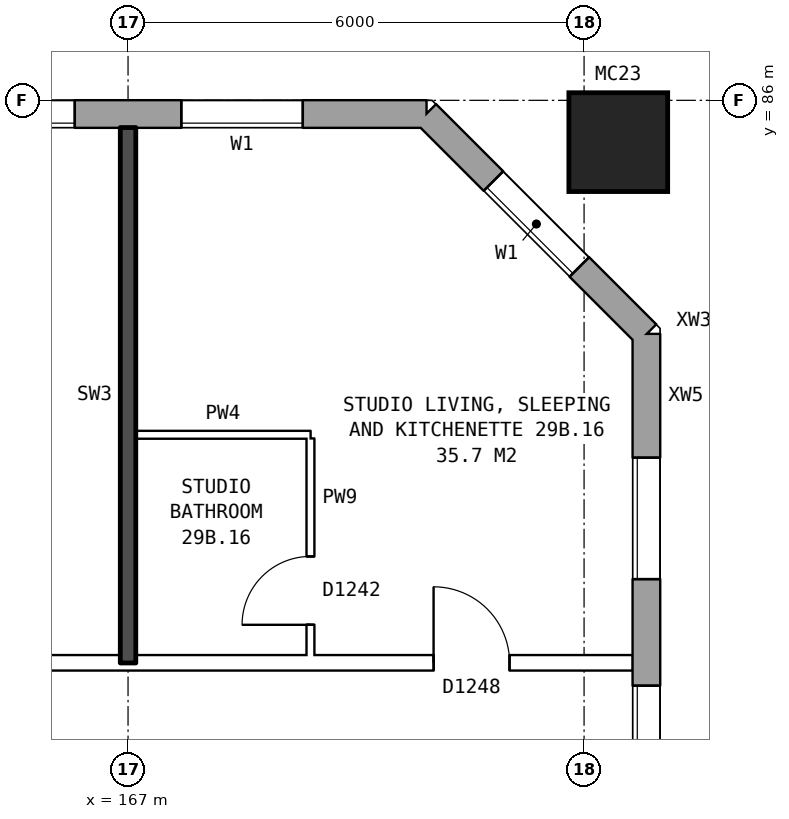
"""IFC4 building model, lengths in metres.
Left out: names, types, materials, properties, quantities, classifications, styles, units other than length and angle.
Written with IfcOpenShell. Run it as: python <this file> out.ifc"""

import sys

from ifc_helpers import new_model, si_unit, direction, frame, frame_2d, origin, origin_2d, place, context, subcontext, project, spatial, rectangle, hollow_rectangle, extrude, element, fill, save


model = new_model("IFC4")
c1 = context("Model", 3, precision=1e-05, world=origin(), true_north=direction((0.0, 1.0)))
c2 = subcontext(c1, "Body", "Model", "MODEL_VIEW")
j1 = project(units=[si_unit("LENGTHUNIT", "METRE"), si_unit("PLANEANGLEUNIT", "RADIAN")], contexts=[c1])
p1 = place(None, origin())
s1 = spatial("IfcSite", under=j1, at=p1, CompositionType="ELEMENT")
p2 = place(p1, origin())
s2 = spatial("IfcBuilding", under=s1, at=p2, CompositionType="ELEMENT")
p3 = place(p2, frame((0.0, 0.0, 105.7)))
s3 = spatial("IfcBuildingStorey", under=s2, at=p3, CompositionType="ELEMENT", Elevation=105.7)
p4 = place(p3, frame((173.45, 85.45, 0.0), z_axis=(0.0, 0.0, 1.0), x_axis=(1.0, 0.0, 0.0)))
e1 = element("IfcColumn", 1, at=p4, inside=s3, PredefinedType="COLUMN", context=c2, shape_type="SweptSolid", body=[
    extrude(hollow_rectangle(XDim=1.3, YDim=1.3, WallThickness=0.07, at=origin_2d()), origin(), (0.0, 0.0, 1.0), 3.1),
])
p5 = place(p3, frame((173.82, 57.075, 0.0), z_axis=(0.0, 0.0, 1.0), x_axis=(0.0, 1.0, 0.0)))
e2 = element("IfcWall", 2, at=p5, inside=s3, PredefinedType="STANDARD", context=c2, shape_type="SweptSolid", body=[
    extrude(rectangle(XDim=25.851, YDim=0.36, at=frame_2d((12.925, 0.0))), origin(), (0.0, 0.0, 1.0), 2.85),
])
p6 = place(p5, frame((1.625, 0.0, 0.8)))
e3 = element("IfcOpeningElement", 3, at=p6, cuts=e2, PredefinedType="OPENING", context=c2, shape_type="SweptSolid", body=[
    extrude(rectangle(XDim=1.6, YDim=1.8, at=frame_2d((0.8, 0.9))), frame((0.0, 0.19, 0.0), z_axis=(0.0, -1.0, 0.0), x_axis=(1.0, 0.0, 0.0)), (0.0, 0.0, 1.0), 0.38),
])
p7 = place(p5, frame((4.625, 0.0, 0.8)))
e4 = element("IfcOpeningElement", 4, at=p7, cuts=e2, PredefinedType="OPENING", context=c2, shape_type="SweptSolid", body=[
    extrude(rectangle(XDim=1.6, YDim=1.8, at=frame_2d((0.8, 0.9))), frame((0.0, 0.19, 0.0), z_axis=(0.0, -1.0, 0.0), x_axis=(1.0, 0.0, 0.0)), (0.0, 0.0, 1.0), 0.38),
])
p8 = place(p5, frame((6.525, 0.0, 0.8)))
e5 = element("IfcOpeningElement", 5, at=p8, cuts=e2, PredefinedType="OPENING", context=c2, shape_type="SweptSolid", body=[
    extrude(rectangle(XDim=1.6, YDim=1.5, at=frame_2d((0.8, 0.75))), frame((0.0, 0.19, 0.0), z_axis=(0.0, -1.0, 0.0), x_axis=(1.0, 0.0, 0.0)), (0.0, 0.0, 1.0), 0.38),
])
p9 = place(p5, frame((8.425, 0.0, 0.8)))
e6 = element("IfcOpeningElement", 6, at=p9, cuts=e2, PredefinedType="OPENING", context=c2, shape_type="SweptSolid", body=[
    extrude(rectangle(XDim=0.6, YDim=0.9, at=frame_2d((0.3, 0.45))), frame((0.0, 0.19, 0.0), z_axis=(0.0, -1.0, 0.0), x_axis=(1.0, 0.0, 0.0)), (0.0, 0.0, 1.0), 0.38),
])
p10 = place(p5, frame((10.275, 0.0, 1.7)))
e7 = element("IfcOpeningElement", 7, at=p10, cuts=e2, PredefinedType="OPENING", context=c2, shape_type="SweptSolid", body=[
    extrude(rectangle(XDim=0.8, YDim=0.9, at=frame_2d((0.4, 0.45))), frame((0.0, 0.19, 0.0), z_axis=(0.0, -1.0, 0.0), x_axis=(1.0, 0.0, 0.0)), (0.0, 0.0, 1.0), 0.38),
])
p11 = place(p5, frame((11.375, 0.0, 1.1)))
e8 = element("IfcOpeningElement", 8, at=p11, cuts=e2, PredefinedType="OPENING", context=c2, shape_type="SweptSolid", body=[
    extrude(rectangle(XDim=0.8, YDim=1.5, at=frame_2d((0.4, 0.75))), frame((0.0, 0.19, 0.0), z_axis=(0.0, -1.0, 0.0), x_axis=(1.0, 0.0, 0.0)), (0.0, 0.0, 1.0), 0.38),
])
p12 = place(p5, frame((19.625, 0.0, 0.8)))
e9 = element("IfcOpeningElement", 9, at=p12, cuts=e2, PredefinedType="OPENING", context=c2, shape_type="SweptSolid", body=[
    extrude(rectangle(XDim=1.6, YDim=1.8, at=frame_2d((0.8, 0.9))), frame((0.0, 0.19, 0.0), z_axis=(0.0, -1.0, 0.0), x_axis=(1.0, 0.0, 0.0)), (0.0, 0.0, 1.0), 0.38),
])
p13 = place(p5, frame((22.625, 0.0, 0.8)))
e10 = element("IfcOpeningElement", 10, at=p13, cuts=e2, PredefinedType="OPENING", context=c2, shape_type="SweptSolid", body=[
    extrude(rectangle(XDim=1.6, YDim=1.8, at=frame_2d((0.8, 0.9))), frame((0.0, 0.19, 0.0), z_axis=(0.0, -1.0, 0.0), x_axis=(1.0, 0.0, 0.0)), (0.0, 0.0, 1.0), 0.38),
])
p14 = place(p5, frame((12.475, 0.0, 0.8)))
e11 = element("IfcOpeningElement", 11, at=p14, cuts=e2, PredefinedType="OPENING", context=c2, shape_type="SweptSolid", body=[
    extrude(rectangle(XDim=1.6, YDim=1.8, at=frame_2d((0.8, 0.9))), frame((0.0, 0.19, 0.0), z_axis=(0.0, -1.0, 0.0), x_axis=(1.0, 0.0, 0.0)), (0.0, 0.0, 1.0), 0.38),
])
p15 = place(p5, frame((14.375, 0.0, 1.7)))
e12 = element("IfcOpeningElement", 12, at=p15, cuts=e2, PredefinedType="OPENING", context=c2, shape_type="SweptSolid", body=[
    extrude(rectangle(XDim=1.2, YDim=0.9, at=frame_2d((0.6, 0.45))), frame((0.0, 0.19, 0.0), z_axis=(0.0, -1.0, 0.0), x_axis=(1.0, 0.0, 0.0)), (0.0, 0.0, 1.0), 0.38),
])
p16 = place(p5, frame((16.725, 0.0, 0.8)))
e13 = element("IfcOpeningElement", 13, at=p16, cuts=e2, PredefinedType="OPENING", context=c2, shape_type="SweptSolid", body=[
    extrude(rectangle(XDim=0.6, YDim=0.9, at=frame_2d((0.3, 0.45))), frame((0.0, 0.19, 0.0), z_axis=(0.0, -1.0, 0.0), x_axis=(1.0, 0.0, 0.0)), (0.0, 0.0, 1.0), 0.38),
])
p17 = place(p5, frame((17.725, 0.0, 0.8)))
e14 = element("IfcOpeningElement", 14, at=p17, cuts=e2, PredefinedType="OPENING", context=c2, shape_type="SweptSolid", body=[
    extrude(rectangle(XDim=1.6, YDim=1.5, at=frame_2d((0.8, 0.75))), frame((0.0, 0.19, 0.0), z_axis=(0.0, -1.0, 0.0), x_axis=(1.0, 0.0, 0.0)), (0.0, 0.0, 1.0), 0.38),
])
p18 = place(p3, frame((173.82, 82.925, 0.0), z_axis=(0.0, 0.0, 1.0), x_axis=(-0.707106781187, 0.707106781187, 0.0)))
e15 = element("IfcWall", 15, at=p18, inside=s3, PredefinedType="STANDARD", context=c2, shape_type="SweptSolid", body=[
    extrude(rectangle(XDim=4.094, YDim=0.36, at=frame_2d((2.047, 0.0))), origin(), (0.0, 0.0, 1.0), 2.85),
])
p19 = place(p18, frame((1.247, 0.0, 0.8)))
e16 = element("IfcOpeningElement", 16, at=p19, cuts=e15, PredefinedType="OPENING", context=c2, shape_type="SweptSolid", body=[
    extrude(rectangle(XDim=1.6, YDim=1.8, at=frame_2d((0.8, 0.9))), frame((0.0, 0.19, 0.0), z_axis=(0.0, -1.0, 0.0), x_axis=(1.0, 0.0, 0.0)), (0.0, 0.0, 1.0), 0.38),
])
p20 = place(p3, frame((170.925, 85.82, 0.0), z_axis=(0.0, 0.0, 1.0), x_axis=(-1.0, 0.0, 0.0)))
e17 = element("IfcWall", 17, at=p20, inside=s3, PredefinedType="STANDARD", context=c2, shape_type="SweptSolid", body=[
    extrude(rectangle(XDim=36.851, YDim=0.36, at=frame_2d((18.425, 0.0))), origin(), (0.0, 0.0, 1.0), 2.85),
])
p21 = place(p20, frame((1.625, 0.0, 0.8)))
e18 = element("IfcOpeningElement", 18, at=p21, cuts=e17, PredefinedType="OPENING", context=c2, shape_type="SweptSolid", body=[
    extrude(rectangle(XDim=1.6, YDim=1.8, at=frame_2d((0.8, 0.9))), frame((0.0, 0.19, 0.0), z_axis=(0.0, -1.0, 0.0), x_axis=(1.0, 0.0, 0.0)), (0.0, 0.0, 1.0), 0.38),
])
p22 = place(p20, frame((4.625, 0.0, 0.8)))
e19 = element("IfcOpeningElement", 19, at=p22, cuts=e17, PredefinedType="OPENING", context=c2, shape_type="SweptSolid", body=[
    extrude(rectangle(XDim=1.6, YDim=1.8, at=frame_2d((0.8, 0.9))), frame((0.0, 0.19, 0.0), z_axis=(0.0, -1.0, 0.0), x_axis=(1.0, 0.0, 0.0)), (0.0, 0.0, 1.0), 0.38),
])
p23 = place(p20, frame((6.525, 0.0, 0.8)))
e20 = element("IfcOpeningElement", 20, at=p23, cuts=e17, PredefinedType="OPENING", context=c2, shape_type="SweptSolid", body=[
    extrude(rectangle(XDim=1.4, YDim=1.8, at=frame_2d((0.7, 0.9))), frame((0.0, 0.19, 0.0), z_axis=(0.0, -1.0, 0.0), x_axis=(1.0, 0.0, 0.0)), (0.0, 0.0, 1.0), 0.38),
])
p24 = place(p20, frame((10.675, 0.0, 0.8)))
e21 = element("IfcOpeningElement", 21, at=p24, cuts=e17, PredefinedType="OPENING", context=c2, shape_type="SweptSolid", body=[
    extrude(rectangle(XDim=0.6, YDim=0.9, at=frame_2d((0.3, 0.45))), frame((0.0, 0.19, 0.0), z_axis=(0.0, -1.0, 0.0), x_axis=(1.0, 0.0, 0.0)), (0.0, 0.0, 1.0), 0.38),
])
p25 = place(p20, frame((13.625, 0.0, 0.8)))
e22 = element("IfcOpeningElement", 22, at=p25, cuts=e17, PredefinedType="OPENING", context=c2, shape_type="SweptSolid", body=[
    extrude(rectangle(XDim=1.6, YDim=1.8, at=frame_2d((0.8, 0.9))), frame((0.0, 0.19, 0.0), z_axis=(0.0, -1.0, 0.0), x_axis=(1.0, 0.0, 0.0)), (0.0, 0.0, 1.0), 0.38),
])
p26 = place(p20, frame((16.625, 0.0, 0.8)))
e23 = element("IfcOpeningElement", 23, at=p26, cuts=e17, PredefinedType="OPENING", context=c2, shape_type="SweptSolid", body=[
    extrude(rectangle(XDim=1.6, YDim=1.8, at=frame_2d((0.8, 0.9))), frame((0.0, 0.19, 0.0), z_axis=(0.0, -1.0, 0.0), x_axis=(1.0, 0.0, 0.0)), (0.0, 0.0, 1.0), 0.38),
])
p27 = place(p20, frame((19.625, 0.0, 0.8)))
e24 = element("IfcOpeningElement", 24, at=p27, cuts=e17, PredefinedType="OPENING", context=c2, shape_type="SweptSolid", body=[
    extrude(rectangle(XDim=1.6, YDim=1.8, at=frame_2d((0.8, 0.9))), frame((0.0, 0.19, 0.0), z_axis=(0.0, -1.0, 0.0), x_axis=(1.0, 0.0, 0.0)), (0.0, 0.0, 1.0), 0.38),
])
p28 = place(p20, frame((22.625, 0.0, 0.8)))
e25 = element("IfcOpeningElement", 25, at=p28, cuts=e17, PredefinedType="OPENING", context=c2, shape_type="SweptSolid", body=[
    extrude(rectangle(XDim=1.6, YDim=1.8, at=frame_2d((0.8, 0.9))), frame((0.0, 0.19, 0.0), z_axis=(0.0, -1.0, 0.0), x_axis=(1.0, 0.0, 0.0)), (0.0, 0.0, 1.0), 0.38),
])
p29 = place(p20, frame((25.075, 0.0, 0.15)))
e26 = element("IfcOpeningElement", 26, at=p29, cuts=e17, PredefinedType="OPENING", context=c2, shape_type="SweptSolid", body=[
    extrude(rectangle(XDim=0.8, YDim=1.8, at=frame_2d((0.4, 0.9))), frame((0.0, 0.19, 0.0), z_axis=(0.0, -1.0, 0.0), x_axis=(1.0, 0.0, 0.0)), (0.0, 0.0, 1.0), 0.38),
])
p30 = place(p20, frame((28.625, 0.0, 0.8)))
e27 = element("IfcOpeningElement", 27, at=p30, cuts=e17, PredefinedType="OPENING", context=c2, shape_type="SweptSolid", body=[
    extrude(rectangle(XDim=1.6, YDim=1.8, at=frame_2d((0.8, 0.9))), frame((0.0, 0.19, 0.0), z_axis=(0.0, -1.0, 0.0), x_axis=(1.0, 0.0, 0.0)), (0.0, 0.0, 1.0), 0.38),
])
p31 = place(p20, frame((31.625, 0.0, 0.8)))
e28 = element("IfcOpeningElement", 28, at=p31, cuts=e17, PredefinedType="OPENING", context=c2, shape_type="SweptSolid", body=[
    extrude(rectangle(XDim=1.6, YDim=1.8, at=frame_2d((0.8, 0.9))), frame((0.0, 0.19, 0.0), z_axis=(0.0, -1.0, 0.0), x_axis=(1.0, 0.0, 0.0)), (0.0, 0.0, 1.0), 0.38),
])
p32 = place(p20, frame((34.625, 0.0, 0.8)))
e29 = element("IfcOpeningElement", 29, at=p32, cuts=e17, PredefinedType="OPENING", context=c2, shape_type="SweptSolid", body=[
    extrude(rectangle(XDim=1.6, YDim=1.8, at=frame_2d((0.8, 0.9))), frame((0.0, 0.19, 0.0), z_axis=(0.0, -1.0, 0.0), x_axis=(1.0, 0.0, 0.0)), (0.0, 0.0, 1.0), 0.38),
])
p33 = place(p20, frame((8.225, 0.0, 1.4)))
e30 = element("IfcOpeningElement", 30, at=p33, cuts=e17, PredefinedType="OPENING", context=c2, shape_type="SweptSolid", body=[
    extrude(rectangle(XDim=1.0, YDim=1.2, at=frame_2d((0.5, 0.6))), frame((0.0, 0.19, 0.0), z_axis=(0.0, -1.0, 0.0), x_axis=(1.0, 0.0, 0.0)), (0.0, 0.0, 1.0), 0.38),
])
p34 = place(p20, frame((11.725, 0.0, 0.8)))
e31 = element("IfcOpeningElement", 31, at=p34, cuts=e17, PredefinedType="OPENING", context=c2, shape_type="SweptSolid", body=[
    extrude(rectangle(XDim=1.6, YDim=1.8, at=frame_2d((0.8, 0.9))), frame((0.0, 0.19, 0.0), z_axis=(0.0, -1.0, 0.0), x_axis=(1.0, 0.0, 0.0)), (0.0, 0.0, 1.0), 0.38),
])
p35 = place(p20, frame((26.175, 0.0, 0.25)))
e32 = element("IfcOpeningElement", 32, at=p35, cuts=e17, PredefinedType="OPENING", context=c2, shape_type="SweptSolid", body=[
    extrude(rectangle(XDim=0.6, YDim=0.9, at=frame_2d((0.3, 0.45))), frame((0.0, 0.19, 0.0), z_axis=(0.0, -1.0, 0.0), x_axis=(1.0, 0.0, 0.0)), (0.0, 0.0, 1.0), 0.38),
])
p36 = place(p3, frame((155.1, 78.6, 0.0), z_axis=(0.0, 0.0, 1.0), x_axis=(1.0, 0.0, 0.0)))
e33 = element("IfcWall", 33, at=p36, inside=s3, PredefinedType="PARTITIONING", context=c2, shape_type="SweptSolid", body=[
    extrude(rectangle(XDim=18.54, YDim=0.2, at=frame_2d((9.27, 0.0))), origin(), (0.0, 0.0, 1.0), 2.85),
])
p37 = place(p36, frame((1.45, 0.0, 0.0)))
e34 = element("IfcOpeningElement", 34, at=p37, cuts=e33, PredefinedType="OPENING", context=c2, shape_type="SweptSolid", body=[
    extrude(rectangle(XDim=1.0, YDim=2.1, at=frame_2d((0.5, 1.05))), frame((0.0, 0.11, 0.0), z_axis=(0.0, -1.0, 0.0), x_axis=(1.0, 0.0, 0.0)), (0.0, 0.0, 1.0), 0.22),
])
p38 = place(p36, frame((9.6, 0.0, 0.0)))
e35 = element("IfcOpeningElement", 35, at=p38, cuts=e33, PredefinedType="OPENING", context=c2, shape_type="SweptSolid", body=[
    extrude(rectangle(XDim=1.0, YDim=2.1, at=frame_2d((0.5, 1.05))), frame((0.0, 0.11, 0.0), z_axis=(0.0, -1.0, 0.0), x_axis=(1.0, 0.0, 0.0)), (0.0, 0.0, 1.0), 0.22),
])
p39 = place(p36, frame((15.92, 0.0, 0.0)))
e36 = element("IfcOpeningElement", 36, at=p39, cuts=e33, PredefinedType="OPENING", context=c2, shape_type="SweptSolid", body=[
    extrude(rectangle(XDim=1.0, YDim=2.1, at=frame_2d((0.5, 1.05))), frame((0.0, 0.11, 0.0), z_axis=(0.0, -1.0, 0.0), x_axis=(1.0, 0.0, 0.0)), (0.0, 0.0, 1.0), 0.22),
])
p40 = place(p3, frame((167.1, 81.6, 0.0), z_axis=(0.0, 0.0, 1.0), x_axis=(1.0, 0.0, 0.0)))
e37 = element("IfcWall", 37, at=p40, inside=s3, PredefinedType="PARTITIONING", context=c2, shape_type="SweptSolid", body=[
    extrude(rectangle(XDim=2.3, YDim=0.1, at=frame_2d((1.15, 0.0))), origin(), (0.0, 0.0, 1.0), 2.85),
])
p41 = place(p3, frame((167.0, 78.6, 0.0), z_axis=(0.0, 0.0, 1.0), x_axis=(0.0, 1.0, 0.0)))
e38 = element("IfcWall", 38, at=p41, inside=s3, PredefinedType="SOLIDWALL", context=c2, shape_type="SweptSolid", body=[
    extrude(rectangle(XDim=7.04, YDim=0.2, at=frame_2d((3.52, 0.0))), origin(), (0.0, 0.0, 1.0), 2.85),
])
p42 = place(p3, frame((169.4, 78.7, 0.0), z_axis=(0.0, 0.0, 1.0), x_axis=(0.0, 1.0, 0.0)))
e39 = element("IfcWall", 39, at=p42, inside=s3, PredefinedType="PARTITIONING", context=c2, shape_type="SweptSolid", body=[
    extrude(rectangle(XDim=2.85, YDim=0.1, at=frame_2d((1.425, 0.0))), origin(), (0.0, 0.0, 1.0), 2.85),
])
p43 = place(p42, frame((0.4, 0.0, 0.0)))
e40 = element("IfcOpeningElement", 40, at=p43, cuts=e39, PredefinedType="OPENING", context=c2, shape_type="SweptSolid", body=[
    extrude(rectangle(XDim=0.9, YDim=2.1, at=frame_2d((0.45, 1.05))), frame((0.0, 0.06, 0.0), z_axis=(0.0, -1.0, 0.0), x_axis=(1.0, 0.0, 0.0)), (0.0, 0.0, 1.0), 0.12),
])
p44 = place(p12, origin())
e41 = element("IfcWindow", 41, at=p44, inside=s3, PartitioningType="SINGLE_PANEL", PredefinedType="WINDOW", context=c2, shape_type="SweptSolid", body=[
    extrude(rectangle(XDim=1.6, YDim=1.8, at=frame_2d((0.8, 0.9))), frame((0.0, 0.15, 0.0), z_axis=(0.0, -1.0, 0.0), x_axis=(1.0, 0.0, 0.0)), (0.0, 0.0, 1.0), 0.06),
])
fill(e9, e41)
p45 = place(p13, origin())
e42 = element("IfcWindow", 42, at=p45, inside=s3, PartitioningType="SINGLE_PANEL", PredefinedType="WINDOW", context=c2, shape_type="SweptSolid", body=[
    extrude(rectangle(XDim=1.6, YDim=1.8, at=frame_2d((0.8, 0.9))), frame((0.0, 0.15, 0.0), z_axis=(0.0, -1.0, 0.0), x_axis=(1.0, 0.0, 0.0)), (0.0, 0.0, 1.0), 0.06),
])
fill(e10, e42)
p46 = place(p19, origin())
e43 = element("IfcWindow", 43, at=p46, inside=s3, PartitioningType="SINGLE_PANEL", PredefinedType="WINDOW", context=c2, shape_type="SweptSolid", body=[
    extrude(rectangle(XDim=1.6, YDim=1.8, at=frame_2d((0.8, 0.9))), frame((0.0, 0.15, 0.0), z_axis=(0.0, -1.0, 0.0), x_axis=(1.0, 0.0, 0.0)), (0.0, 0.0, 1.0), 0.06),
])
fill(e16, e43)
p47 = place(p21, origin())
e44 = element("IfcWindow", 44, at=p47, inside=s3, PartitioningType="SINGLE_PANEL", PredefinedType="WINDOW", context=c2, shape_type="SweptSolid", body=[
    extrude(rectangle(XDim=1.6, YDim=1.8, at=frame_2d((0.8, 0.9))), frame((0.0, 0.15, 0.0), z_axis=(0.0, -1.0, 0.0), x_axis=(1.0, 0.0, 0.0)), (0.0, 0.0, 1.0), 0.06),
])
fill(e18, e44)
p48 = place(p22, origin())
e45 = element("IfcWindow", 45, at=p48, inside=s3, PartitioningType="SINGLE_PANEL", PredefinedType="WINDOW", context=c2, shape_type="SweptSolid", body=[
    extrude(rectangle(XDim=1.6, YDim=1.8, at=frame_2d((0.8, 0.9))), frame((0.0, 0.15, 0.0), z_axis=(0.0, -1.0, 0.0), x_axis=(1.0, 0.0, 0.0)), (0.0, 0.0, 1.0), 0.06),
])
fill(e19, e45)
p49 = place(p39, origin())
e46 = element("IfcDoor", 46, at=p49, inside=s3, OperationType="SINGLE_SWING_LEFT", PredefinedType="DOOR", context=c2, shape_type="SweptSolid", body=[
    extrude(rectangle(XDim=1.0, YDim=2.1, at=frame_2d((0.5, 1.05))), frame((0.0, 0.025, 0.0), z_axis=(0.0, -1.0, 0.0), x_axis=(1.0, 0.0, 0.0)), (0.0, 0.0, 1.0), 0.05),
])
fill(e36, e46)
p50 = place(p43, origin())
e47 = element("IfcDoor", 47, at=p50, inside=s3, OperationType="SINGLE_SWING_LEFT", PredefinedType="DOOR", context=c2, shape_type="SweptSolid", body=[
    extrude(rectangle(XDim=0.9, YDim=2.1, at=frame_2d((0.45, 1.05))), frame((0.0, 0.025, 0.0), z_axis=(0.0, -1.0, 0.0), x_axis=(1.0, 0.0, 0.0)), (0.0, 0.0, 1.0), 0.05),
])
fill(e40, e47)
save(model, sys.argv[1])
